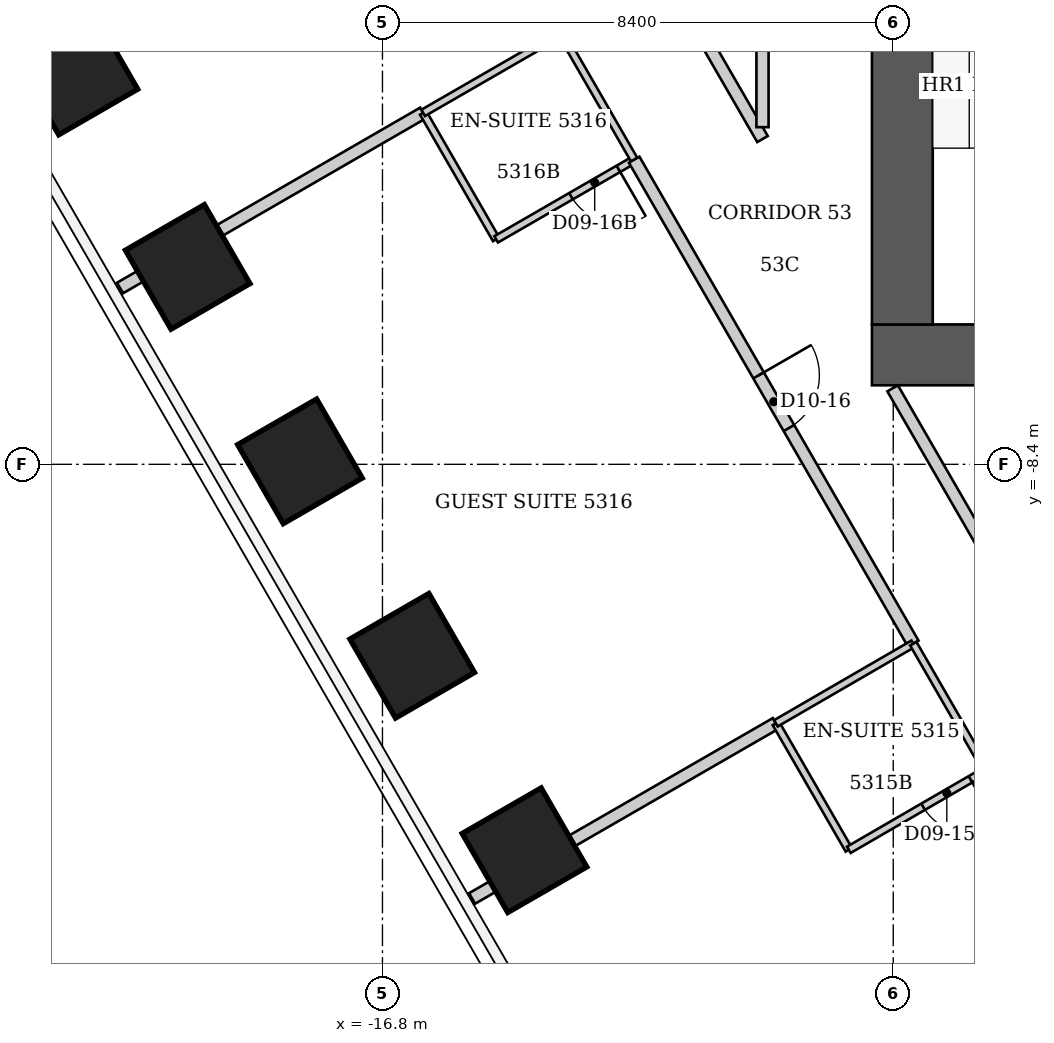
"""IFC4 building model, lengths in metres.
Left out: names, types, materials, properties, quantities, classifications, styles, units other than length and angle.
Written with IfcOpenShell. Run it as: python <this file> out.ifc"""

import sys

from ifc_helpers import new_model, si_unit, direction, frame, frame_2d, origin, origin_2d, place, context, subcontext, project, spatial, rectangle, extrude, element, fill, save


model = new_model("IFC4")
c1 = context("Model", 3, precision=1e-05, world=origin(), true_north=direction((0.0, 1.0)))
c2 = subcontext(c1, "Body", "Model", "MODEL_VIEW")
j1 = project(units=[si_unit("LENGTHUNIT", "METRE"), si_unit("PLANEANGLEUNIT", "RADIAN")], contexts=[c1])
p1 = place(None, origin())
s1 = spatial("IfcSite", under=j1, at=p1, CompositionType="ELEMENT")
p2 = place(p1, origin())
s2 = spatial("IfcBuilding", under=s1, at=p2, CompositionType="ELEMENT")
p3 = place(p2, frame((0.0, 0.0, 213.6)))
s3 = spatial("IfcBuildingStorey", under=s2, at=p3, CompositionType="ELEMENT", Elevation=213.6)
for number, where, z_axis, x_axis in (
    (1, (-14.465, -14.747, 0.0), (0.0, 0.0, 1.0), (-0.866, -0.5, 0.0)),
    (2, (-16.311, -11.549, 0.0), (0.0, 0.0, 1.0), (-0.866, -0.5, 0.0)),
    (3, (-18.157, -8.351, 0.0), (0.0, 0.0, 1.0), (-0.866, -0.5, 0.0)),
    (4, (-20.003, -5.153, 0.0), (0.0, 0.0, 1.0), (-0.866, -0.5, 0.0)),
    (5, (-21.85, -1.956, 0.0), (0.0, 0.0, 1.0), (-0.866, -0.5, 0.0)),
):
    element("IfcColumn", number, at=place(p3, frame(where, z_axis=z_axis, x_axis=x_axis)), inside=s3, PredefinedType="COLUMN", context=c2, shape_type="SweptSolid", body=[
        extrude(rectangle(XDim=1.5, YDim=1.5, at=origin_2d()), origin(), (0.0, 0.0, 1.0), 3.8),
    ])
p4 = place(p3, frame((-8.75, -6.6, 0.0), z_axis=(0.0, 0.0, 1.0), x_axis=(1.0, 0.0, 0.0)))
e6 = element("IfcWall", 6, at=p4, inside=s3, PredefinedType="SHEAR", context=c2, shape_type="SweptSolid", body=[
    extrude(rectangle(XDim=17.5, YDim=1.0, at=frame_2d((8.75, 0.0))), origin(), (0.0, 0.0, 1.0), 3.8),
])
p5 = place(p3, frame((-8.25, -6.1, 0.0), z_axis=(0.0, 0.0, 1.0), x_axis=(0.0, 1.0, 0.0)))
e7 = element("IfcWall", 7, at=p5, inside=s3, PredefinedType="SHEAR", context=c2, shape_type="SweptSolid", body=[
    extrude(rectangle(XDim=12.2, YDim=1.0, at=frame_2d((6.1, 0.0))), origin(), (0.0, 0.0, 1.0), 3.8),
])
p6 = place(p5, frame((7.6, 0.0, 0.0)))
e8 = element("IfcOpeningElement", 8, at=p6, cuts=e7, PredefinedType="OPENING", context=c2, shape_type="SweptSolid", body=[
    extrude(rectangle(XDim=1.2, YDim=2.2, at=frame_2d((0.6, 1.1))), frame((0.0, 0.5, 0.0), z_axis=(0.0, -1.0, 0.0), x_axis=(1.0, 0.0, 0.0)), (0.0, 0.0, 1.0), 1.0),
])
p7 = place(p3, frame((-21.116, -5.5, 0.0), z_axis=(0.0, 0.0, 1.0), x_axis=(0.865919350456, 0.50018364478, 0.0)))
e9 = element("IfcWall", 9, at=p7, inside=s3, PredefinedType="PARTITIONING", context=c2, shape_type="SweptSolid", body=[
    extrude(rectangle(XDim=5.758, YDim=0.2, at=frame_2d((2.879, 0.0))), origin(), (0.0, 0.0, 1.0), 3.64),
])
p8 = place(p3, frame((-16.13, -2.62, 0.0), z_axis=(0.0, 0.0, 1.0), x_axis=(0.499737123639, -0.866177122335, 0.0)))
e10 = element("IfcWall", 10, at=p8, inside=s3, PredefinedType="PARTITIONING", context=c2, shape_type="SweptSolid", body=[
    extrude(rectangle(XDim=2.401, YDim=0.12, at=frame_2d((1.201, 0.0))), origin(), (0.0, 0.0, 1.0), 3.64),
])
p9 = place(p3, frame((-16.13, -2.62, 0.0), z_axis=(0.0, 0.0, 1.0), x_axis=(0.866114241029, 0.499846097802, 0.0)))
e11 = element("IfcWall", 11, at=p9, inside=s3, PredefinedType="PARTITIONING", context=c2, shape_type="SweptSolid", body=[
    extrude(rectangle(XDim=2.621, YDim=0.12, at=frame_2d((1.311, 0.0))), origin(), (0.0, 0.0, 1.0), 3.64),
])
p10 = place(p3, frame((-15.326, -15.54, 0.0), z_axis=(0.0, 0.0, 1.0), x_axis=(0.866342721203, 0.499449986905, 0.0)))
e12 = element("IfcWall", 12, at=p10, inside=s3, PredefinedType="PARTITIONING", context=c2, shape_type="SweptSolid", body=[
    extrude(rectangle(XDim=5.767, YDim=0.2, at=frame_2d((2.883, 0.0))), origin(), (0.0, 0.0, 1.0), 3.64),
])
p11 = place(p3, frame((-14.93, -4.7, 0.0), z_axis=(0.0, 0.0, 1.0), x_axis=(0.866114241029, 0.499846097802, 0.0)))
e13 = element("IfcWall", 13, at=p11, inside=s3, PredefinedType="PARTITIONING", context=c2, shape_type="SweptSolid", body=[
    extrude(rectangle(XDim=2.621, YDim=0.12, at=frame_2d((1.311, 0.0))), origin(), (0.0, 0.0, 1.0), 3.64),
])
p12 = place(p11, frame((1.421, 0.0, 0.0)))
e14 = element("IfcOpeningElement", 14, at=p12, cuts=e13, PredefinedType="OPENING", context=c2, shape_type="SweptSolid", body=[
    extrude(rectangle(XDim=0.9, YDim=2.03, at=frame_2d((0.45, 1.015))), frame((0.0, 0.06, 0.0), z_axis=(0.0, -1.0, 0.0), x_axis=(1.0, 0.0, 0.0)), (0.0, 0.0, 1.0), 0.12),
])
p13 = place(p3, frame((-13.86, -1.31, 0.0), z_axis=(0.0, 0.0, 1.0), x_axis=(0.499813401482, -0.866133109688, 0.0)))
e15 = element("IfcWall", 15, at=p13, inside=s3, PredefinedType="PARTITIONING", context=c2, shape_type="SweptSolid", body=[
    extrude(rectangle(XDim=2.401, YDim=0.12, at=frame_2d((1.201, 0.0))), origin(), (0.0, 0.0, 1.0), 3.64),
])
p14 = place(p3, frame((-12.66, -3.39, 0.0), z_axis=(0.0, 0.0, 1.0), x_axis=(0.499511590934, -0.866307203319, 0.0)))
e16 = element("IfcWall", 16, at=p14, inside=s3, PredefinedType="PARTITIONING", context=c2, shape_type="SweptSolid", body=[
    extrude(rectangle(XDim=9.189, YDim=0.2, at=frame_2d((4.594, 0.0))), origin(), (0.0, 0.0, 1.0), 3.64),
])
p15 = place(p14, frame((4.094, 0.0, 0.0)))
e17 = element("IfcOpeningElement", 17, at=p15, cuts=e16, PredefinedType="OPENING", context=c2, shape_type="SweptSolid", body=[
    extrude(rectangle(XDim=1.0, YDim=2.13, at=frame_2d((0.5, 1.065))), frame((0.0, 0.1, 0.0), z_axis=(0.0, -1.0, 0.0), x_axis=(1.0, 0.0, 0.0)), (0.0, 0.0, 1.0), 0.2),
])
p16 = place(p3, frame((-10.55, -3.05, 0.0), z_axis=(0.0, 0.0, 1.0), x_axis=(-0.500193590286, 0.865913605527, 0.0)))
e18 = element("IfcWall", 18, at=p16, inside=s3, PredefinedType="PARTITIONING", context=c2, shape_type="SweptSolid", body=[
    extrude(rectangle(XDim=5.278, YDim=0.2, at=frame_2d((2.639, 0.0))), origin(), (0.0, 0.0, 1.0), 3.64),
])
p17 = place(p16, frame((2.25, 0.0, 0.0)))
e19 = element("IfcOpeningElement", 19, at=p17, cuts=e18, PredefinedType="OPENING", context=c2, shape_type="SweptSolid", body=[
    extrude(rectangle(XDim=1.1, YDim=2.2, at=frame_2d((0.55, 1.1))), frame((0.0, 0.1, 0.0), z_axis=(0.0, -1.0, 0.0), x_axis=(1.0, 0.0, 0.0)), (0.0, 0.0, 1.0), 0.2),
])
p18 = place(p3, frame((-10.55, 1.52, 0.0), z_axis=(0.0, 0.0, 1.0), x_axis=(0.0, -1.0, 0.0)))
e20 = element("IfcWall", 20, at=p18, inside=s3, PredefinedType="PARTITIONING", context=c2, shape_type="SweptSolid", body=[
    extrude(rectangle(XDim=4.375, YDim=0.2, at=frame_2d((2.188, 0.0))), origin(), (0.0, 0.0, 1.0), 3.64),
])
p19 = place(p3, frame((-10.33, -12.66, 0.0), z_axis=(0.0, 0.0, 1.0), x_axis=(0.499693115345, -0.866202511239, 0.0)))
e21 = element("IfcWall", 21, at=p19, inside=s3, PredefinedType="PARTITIONING", context=c2, shape_type="SweptSolid", body=[
    extrude(rectangle(XDim=2.401, YDim=0.12, at=frame_2d((1.201, 0.0))), origin(), (0.0, 0.0, 1.0), 3.64),
])
p20 = place(p3, frame((-10.33, -12.66, 0.0), z_axis=(0.0, 0.0, 1.0), x_axis=(0.865195830568, 0.501434118073, 0.0)))
e22 = element("IfcWall", 22, at=p20, inside=s3, PredefinedType="PARTITIONING", context=c2, shape_type="SweptSolid", body=[
    extrude(rectangle(XDim=2.612, YDim=0.12, at=frame_2d((1.306, 0.0))), origin(), (0.0, 0.0, 1.0), 3.64),
])
p21 = place(p3, frame((-9.13, -14.74, 0.0), z_axis=(0.0, 0.0, 1.0), x_axis=(0.865131772832, 0.501544629755, 0.0)))
e23 = element("IfcWall", 23, at=p21, inside=s3, PredefinedType="PARTITIONING", context=c2, shape_type="SweptSolid", body=[
    extrude(rectangle(XDim=2.612, YDim=0.12, at=frame_2d((1.306, 0.0))), origin(), (0.0, 0.0, 1.0), 3.64),
])
p22 = place(p21, frame((1.412, 0.0, 0.0)))
e24 = element("IfcOpeningElement", 24, at=p22, cuts=e23, PredefinedType="OPENING", context=c2, shape_type="SweptSolid", body=[
    extrude(rectangle(XDim=0.9, YDim=2.03, at=frame_2d((0.45, 1.015))), frame((0.0, 0.06, 0.0), z_axis=(0.0, -1.0, 0.0), x_axis=(1.0, 0.0, 0.0)), (0.0, 0.0, 1.0), 0.12),
])
p23 = place(p3, frame((-9.01, -26.012, 0.0), z_axis=(0.0, 0.0, 1.0), x_axis=(0.327582991606, 0.944822408504, 0.0)))
e25 = element("IfcWall", 25, at=p23, inside=s3, PredefinedType="PARTITIONING", context=c2, shape_type="SweptSolid", body=[
    extrude(rectangle(XDim=10.667, YDim=0.2, at=frame_2d((5.333, 0.0))), origin(), (0.0, 0.0, 1.0), 3.64),
])
p24 = place(p3, frame((-8.07, -11.35, 0.0), z_axis=(0.0, 0.0, 1.0), x_axis=(0.499737123639, -0.866177122335, 0.0)))
e26 = element("IfcWall", 26, at=p24, inside=s3, PredefinedType="PARTITIONING", context=c2, shape_type="SweptSolid", body=[
    extrude(rectangle(XDim=2.401, YDim=0.12, at=frame_2d((1.201, 0.0))), origin(), (0.0, 0.0, 1.0), 3.64),
])
p25 = place(p3, frame((-4.0, -14.79, 0.0), z_axis=(0.0, 0.0, 1.0), x_axis=(-0.499916512745, 0.866073599808, 0.0)))
e27 = element("IfcWall", 27, at=p25, inside=s3, PredefinedType="PARTITIONING", context=c2, shape_type="SweptSolid", body=[
    extrude(rectangle(XDim=8.821, YDim=0.2, at=frame_2d((4.411, 0.0))), origin(), (0.0, 0.0, 1.0), 3.64),
])
p26 = place(p25, frame((3.861, 0.0, 0.0)))
e28 = element("IfcOpeningElement", 28, at=p26, cuts=e27, PredefinedType="OPENING", context=c2, shape_type="SweptSolid", body=[
    extrude(rectangle(XDim=1.1, YDim=2.2, at=frame_2d((0.55, 1.1))), frame((0.0, 0.1, 0.0), z_axis=(0.0, -1.0, 0.0), x_axis=(1.0, 0.0, 0.0)), (0.0, 0.0, 1.0), 0.2),
])
p27 = place(p22, origin())
e29 = element("IfcDoor", 29, at=p27, inside=s3, OperationType="SINGLE_SWING_RIGHT", PredefinedType="DOOR", context=c2, shape_type="SweptSolid", body=[
    extrude(rectangle(XDim=0.9, YDim=2.03, at=frame_2d((0.45, 1.015))), frame((0.0, 0.025, 0.0), z_axis=(0.0, -1.0, 0.0), x_axis=(1.0, 0.0, 0.0)), (0.0, 0.0, 1.0), 0.05),
])
fill(e24, e29)
p28 = place(p15, origin())
e30 = element("IfcDoor", 30, at=p28, inside=s3, OperationType="SINGLE_SWING_LEFT", PredefinedType="DOOR", context=c2, shape_type="SweptSolid", body=[
    extrude(rectangle(XDim=1.0, YDim=2.13, at=frame_2d((0.5, 1.065))), frame((0.0, 0.025, 0.0), z_axis=(0.0, -1.0, 0.0), x_axis=(1.0, 0.0, 0.0)), (0.0, 0.0, 1.0), 0.05),
])
fill(e17, e30)
p29 = place(p12, origin())
e31 = element("IfcDoor", 31, at=p29, inside=s3, OperationType="SINGLE_SWING_RIGHT", PredefinedType="DOOR", context=c2, shape_type="SweptSolid", body=[
    extrude(rectangle(XDim=0.9, YDim=2.03, at=frame_2d((0.45, 1.015))), frame((0.0, 0.025, 0.0), z_axis=(0.0, -1.0, 0.0), x_axis=(1.0, 0.0, 0.0)), (0.0, 0.0, 1.0), 0.05),
])
fill(e14, e31)
save(model, sys.argv[1])
